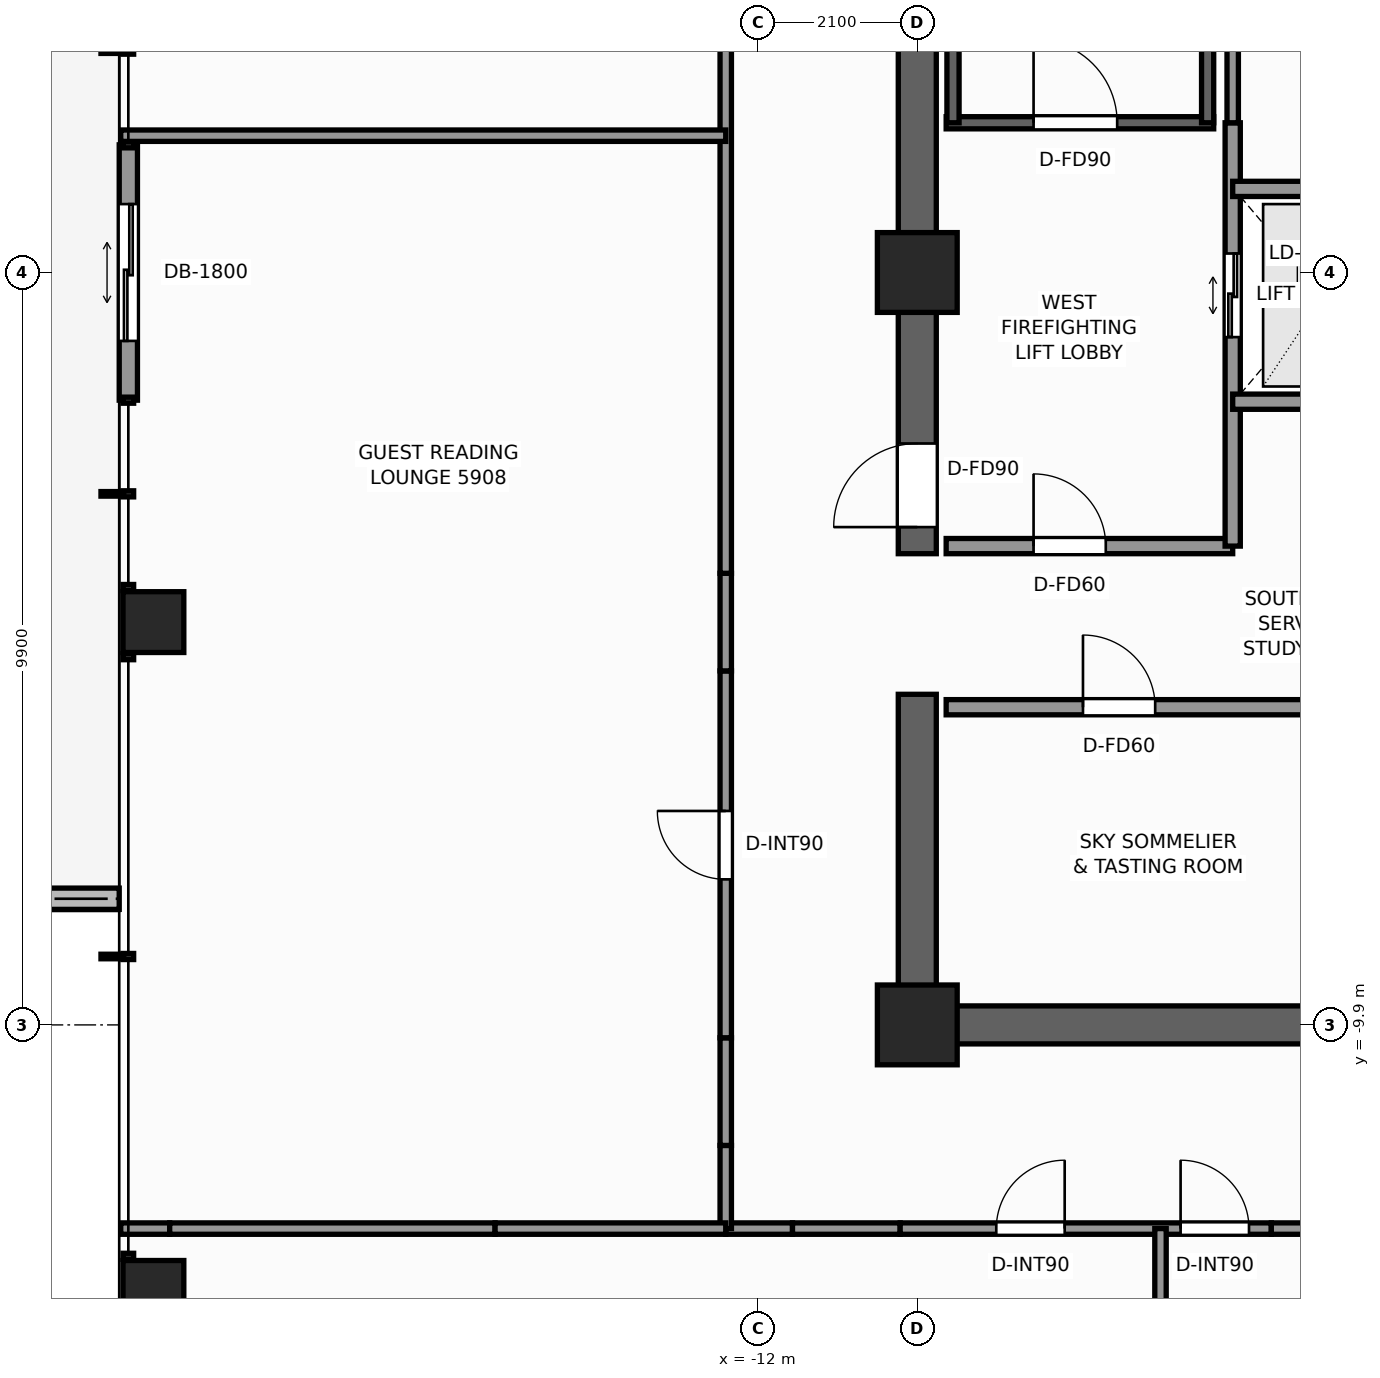
"""IFC4 building model, lengths in metres.
Left out: names, types, materials, properties, quantities, classifications, styles, units other than length and angle.
Written with IfcOpenShell. Run it as: python <this file> out.ifc"""

import sys

from ifc_helpers import new_model, si_unit, direction, frame, frame_2d, origin, origin_2d, place, context, subcontext, project, spatial, rectangle, extrude, element, fill, save


model = new_model("IFC4")
c1 = context("Model", 3, precision=1e-05, world=origin(), true_north=direction((0.0, 1.0)))
c2 = subcontext(c1, "Body", "Model", "MODEL_VIEW")
j1 = project(units=[si_unit("LENGTHUNIT", "METRE"), si_unit("PLANEANGLEUNIT", "RADIAN")], contexts=[c1])
p1 = place(None, origin())
s1 = spatial("IfcSite", under=j1, at=p1, CompositionType="ELEMENT")
p2 = place(p1, origin())
s2 = spatial("IfcBuilding", under=s1, at=p2, CompositionType="ELEMENT")
p3 = place(p2, frame((0.0, 0.0, 203.1)))
s3 = spatial("IfcBuildingStorey", under=s2, at=p3, CompositionType="ELEMENT", Elevation=203.1)
p4 = place(p3, frame((-3.54, -9.9, 0.0), z_axis=(0.0, 0.0, 1.0), x_axis=(-1.0, 0.0, 0.0)))
e1 = element("IfcWall", 1, at=p4, inside=s3, PredefinedType="SHEAR", context=c2, shape_type="SweptSolid", body=[
    extrude(rectangle(XDim=6.61, YDim=0.5, at=frame_2d((3.305, 0.0))), origin(), (0.0, 0.0, 1.0), 3.3),
])
p5 = place(p3, frame((-9.9, -9.65, 0.0), z_axis=(0.0, 0.0, 1.0), x_axis=(0.0, 1.0, 0.0)))
e2 = element("IfcWall", 2, at=p5, inside=s3, PredefinedType="SHEAR", context=c2, shape_type="SweptSolid", body=[
    extrude(rectangle(XDim=4.1, YDim=0.5, at=frame_2d((2.05, 0.0))), origin(), (0.0, 0.0, 1.0), 3.3),
])
p6 = place(p3, frame((-9.9, -3.7, 0.0), z_axis=(0.0, 0.0, 1.0), x_axis=(0.0, 1.0, 0.0)))
e3 = element("IfcWall", 3, at=p6, inside=s3, PredefinedType="SHEAR", context=c2, shape_type="SweptSolid", body=[
    extrude(rectangle(XDim=13.35, YDim=0.5, at=frame_2d((6.675, 0.0))), origin(), (0.0, 0.0, 1.0), 3.3),
])
p7 = place(p6, frame((0.35, 0.0, 0.0)))
e4 = element("IfcOpeningElement", 4, at=p7, cuts=e3, PredefinedType="OPENING", context=c2, shape_type="SweptSolid", body=[
    extrude(rectangle(XDim=1.1, YDim=2.2, at=frame_2d((0.55, 1.1))), frame((0.0, 0.26, 0.0), z_axis=(0.0, -1.0, 0.0), x_axis=(1.0, 0.0, 0.0)), (0.0, 0.0, 1.0), 0.52),
])
for number, where, z_axis, x_axis in (
    (5, (-9.9, -9.9, 0.0), (0.0, 0.0, 1.0), (1.0, 0.0, 0.0)),
    (6, (-9.9, 0.0, 0.0), (0.0, 0.0, 1.0), (1.0, 0.0, 0.0)),
):
    element("IfcColumn", number, at=place(p3, frame(where, z_axis=z_axis, x_axis=x_axis)), inside=s3, PredefinedType="COLUMN", context=c2, shape_type="SweptSolid", body=[
        extrude(rectangle(XDim=1.05, YDim=1.05, at=origin_2d()), origin(), (0.0, 0.0, 1.0), 3.3),
    ])
for number, where, z_axis, x_axis in (
    (7, (-19.95, -13.4, 0.0), (0.0, 0.0, 1.0), (1.0, 0.0, 0.0)),
    (8, (-19.95, -4.6, 0.0), (0.0, 0.0, 1.0), (1.0, 0.0, 0.0)),
):
    element("IfcColumn", number, at=place(p3, frame(where, z_axis=z_axis, x_axis=x_axis)), inside=s3, PredefinedType="COLUMN", context=c2, shape_type="SweptSolid", body=[
        extrude(rectangle(XDim=0.8, YDim=0.8, at=origin_2d()), origin(), (0.0, 0.0, 1.0), 3.3),
    ])
p8 = place(p3, frame((-22.406, -8.24, -0.04), z_axis=(0.0, 0.0, 1.0), x_axis=(1.0, 0.0, 0.0)))
e9 = element("IfcWall", 9, at=p8, inside=s3, PredefinedType="PARAPET", context=c2, shape_type="SweptSolid", body=[
    extrude(rectangle(XDim=2.006, YDim=0.28, at=frame_2d((1.003, 0.0))), origin(), (0.0, 0.0, 1.0), 0.42),
])
p9 = place(p3, frame((-20.28, -1.68, 0.0), z_axis=(0.0, 0.0, 1.0), x_axis=(0.0, 1.0, 0.0)))
e10 = element("IfcWall", 10, at=p9, inside=s3, PredefinedType="STANDARD", context=c2, shape_type="SweptSolid", body=[
    extrude(rectangle(XDim=3.36, YDim=0.24, at=frame_2d((1.68, 0.0))), origin(), (0.0, 0.0, 1.0), 3.08),
])
p10 = place(p9, frame((0.78, 0.0, 0.0)))
e11 = element("IfcOpeningElement", 11, at=p10, cuts=e10, PredefinedType="OPENING", context=c2, shape_type="SweptSolid", body=[
    extrude(rectangle(XDim=1.8, YDim=2.2, at=frame_2d((0.9, 1.1))), frame((0.0, 0.13, 0.0), z_axis=(0.0, -1.0, 0.0), x_axis=(1.0, 0.0, 0.0)), (0.0, 0.0, 1.0), 0.26),
])
p11 = place(p3, frame((-9.52, 1.97, 0.0), z_axis=(0.0, 0.0, 1.0), x_axis=(1.0, 0.0, 0.0)))
e12 = element("IfcWall", 12, at=p11, inside=s3, PredefinedType="SHEAR", context=c2, shape_type="SweptSolid", body=[
    extrude(rectangle(XDim=3.52, YDim=0.16, at=frame_2d((1.76, 0.0))), origin(), (0.0, 0.0, 1.0), 3.3),
])
p12 = place(p11, frame((1.15, 0.0, 0.0)))
e13 = element("IfcOpeningElement", 13, at=p12, cuts=e12, PredefinedType="OPENING", context=c2, shape_type="SweptSolid", body=[
    extrude(rectangle(XDim=1.1, YDim=2.2, at=frame_2d((0.55, 1.1))), frame((0.0, 0.09, 0.0), z_axis=(0.0, -1.0, 0.0), x_axis=(1.0, 0.0, 0.0)), (0.0, 0.0, 1.0), 0.18),
])
for number, where, z_axis, x_axis in (
    (14, (-9.43, 1.97, 0.0), (0.0, 0.0, 1.0), (0.0, 1.0, 0.0)),
    (15, (-6.08, 1.97, 0.0), (0.0, 0.0, 1.0), (0.0, 1.0, 0.0)),
):
    element("IfcWall", number, at=place(p3, frame(where, z_axis=z_axis, x_axis=x_axis)), inside=s3, PredefinedType="SHEAR", context=c2, shape_type="SweptSolid", body=[
        extrude(rectangle(XDim=7.56, YDim=0.16, at=frame_2d((3.78, 0.0))), origin(), (0.0, 0.0, 1.0), 3.3),
    ])
p13 = place(p3, frame((-9.52, -3.6, 0.0), z_axis=(0.0, 0.0, 1.0), x_axis=(1.0, 0.0, 0.0)))
e16 = element("IfcWall", 16, at=p13, inside=s3, PredefinedType="SOLIDWALL", context=c2, shape_type="SweptSolid", body=[
    extrude(rectangle(XDim=3.77, YDim=0.2, at=frame_2d((1.885, 0.0))), origin(), (0.0, 0.0, 1.0), 3.08),
])
p14 = place(p13, frame((1.15, 0.0, 0.0)))
e17 = element("IfcOpeningElement", 17, at=p14, cuts=e16, PredefinedType="OPENING", context=c2, shape_type="SweptSolid", body=[
    extrude(rectangle(XDim=0.95, YDim=2.06, at=frame_2d((0.475, 1.03))), frame((0.0, 0.11, 0.0), z_axis=(0.0, -1.0, 0.0), x_axis=(1.0, 0.0, 0.0)), (0.0, 0.0, 1.0), 0.22),
])
p15 = place(p3, frame((-5.75, -3.6, 0.0), z_axis=(0.0, 0.0, 1.0), x_axis=(0.0, 1.0, 0.0)))
e18 = element("IfcWall", 18, at=p15, inside=s3, PredefinedType="SOLIDWALL", context=c2, shape_type="SweptSolid", body=[
    extrude(rectangle(XDim=5.57, YDim=0.2, at=frame_2d((2.785, 0.0))), origin(), (0.0, 0.0, 1.0), 3.08),
])
p16 = place(p15, frame((2.75, 0.0, 0.0)))
e19 = element("IfcOpeningElement", 19, at=p16, cuts=e18, PredefinedType="OPENING", context=c2, shape_type="SweptSolid", body=[
    extrude(rectangle(XDim=1.1, YDim=2.2, at=frame_2d((0.55, 1.1))), frame((0.0, 0.11, 0.0), z_axis=(0.0, -1.0, 0.0), x_axis=(1.0, 0.0, 0.0)), (0.0, 0.0, 1.0), 0.22),
])
for number, where, z_axis, x_axis in (
    (20, (-5.75, -1.7, 0.0), (0.0, 0.0, 1.0), (1.0, 0.0, 0.0)),
    (21, (-5.75, 1.1, 0.0), (0.0, 0.0, 1.0), (1.0, 0.0, 0.0)),
):
    element("IfcWall", number, at=place(p3, frame(where, z_axis=z_axis, x_axis=x_axis)), inside=s3, PredefinedType="SOLIDWALL", context=c2, shape_type="SweptSolid", body=[
        extrude(rectangle(XDim=2.4, YDim=0.2, at=frame_2d((1.2, 0.0))), origin(), (0.0, 0.0, 1.0), 3.08),
    ])
p17 = place(p3, frame((-9.52, -5.72, 0.0), z_axis=(0.0, 0.0, 1.0), x_axis=(1.0, 0.0, 0.0)))
e22 = element("IfcWall", 22, at=p17, inside=s3, PredefinedType="SOLIDWALL", context=c2, shape_type="SweptSolid", body=[
    extrude(rectangle(XDim=5.66, YDim=0.2, at=frame_2d((2.83, 0.0))), origin(), (0.0, 0.0, 1.0), 3.08),
])
p18 = place(p17, frame((1.8, 0.0, 0.0)))
e23 = element("IfcOpeningElement", 23, at=p18, cuts=e22, PredefinedType="OPENING", context=c2, shape_type="SweptSolid", body=[
    extrude(rectangle(XDim=0.95, YDim=2.06, at=frame_2d((0.475, 1.03))), frame((0.0, 0.11, 0.0), z_axis=(0.0, -1.0, 0.0), x_axis=(1.0, 0.0, 0.0)), (0.0, 0.0, 1.0), 0.22),
])
p19 = place(p3, frame((-5.75, 1.97, 0.0), z_axis=(0.0, 0.0, 1.0), x_axis=(0.0, 1.0, 0.0)))
e24 = element("IfcWall", 24, at=p19, inside=s3, PredefinedType="PARTITIONING", context=c2, shape_type="SweptSolid", body=[
    extrude(rectangle(XDim=2.33, YDim=0.15, at=frame_2d((1.165, 0.0))), origin(), (0.0, 0.0, 1.0), 3.08),
])
p20 = place(p3, frame((-12.42, -12.58, 0.0), z_axis=(0.0, 0.0, 1.0), x_axis=(1.0, 0.0, 0.0)))
e25 = element("IfcWall", 25, at=p20, inside=s3, PredefinedType="PARTITIONING", context=c2, shape_type="SweptSolid", body=[
    extrude(rectangle(XDim=0.878, YDim=0.15, at=frame_2d((0.439, 0.0))), origin(), (0.0, 0.0, 1.0), 3.08),
])
p21 = place(p3, frame((-11.542, -12.58, 0.0), z_axis=(0.0, 0.0, 1.0), x_axis=(1.0, 0.0, 0.0)))
e26 = element("IfcWall", 26, at=p21, inside=s3, PredefinedType="PARTITIONING", context=c2, shape_type="SweptSolid", body=[
    extrude(rectangle(XDim=1.417, YDim=0.15, at=frame_2d((0.708, 0.0))), origin(), (0.0, 0.0, 1.0), 1.265),
])
p22 = place(p3, frame((-10.125, -12.58, 0.0), z_axis=(0.0, 0.0, 1.0), x_axis=(1.0, 0.0, 0.0)))
e27 = element("IfcWall", 27, at=p22, inside=s3, PredefinedType="PARTITIONING", context=c2, shape_type="SweptSolid", body=[
    extrude(rectangle(XDim=4.883, YDim=0.15, at=frame_2d((2.441, 0.0))), origin(), (0.0, 0.0, 1.0), 3.08),
])
p23 = place(p22, frame((1.264, 0.0, 0.0)))
e28 = element("IfcOpeningElement", 28, at=p23, cuts=e27, PredefinedType="OPENING", context=c2, shape_type="SweptSolid", body=[
    extrude(rectangle(XDim=0.9, YDim=2.06, at=frame_2d((0.45, 1.03))), frame((0.0, 0.085, 0.0), z_axis=(0.0, -1.0, 0.0), x_axis=(1.0, 0.0, 0.0)), (0.0, 0.0, 1.0), 0.17),
])
p24 = place(p22, frame((3.689, 0.0, 0.0)))
e29 = element("IfcOpeningElement", 29, at=p24, cuts=e27, PredefinedType="OPENING", context=c2, shape_type="SweptSolid", body=[
    extrude(rectangle(XDim=0.9, YDim=2.06, at=frame_2d((0.45, 1.03))), frame((0.0, 0.085, 0.0), z_axis=(0.0, -1.0, 0.0), x_axis=(1.0, 0.0, 0.0)), (0.0, 0.0, 1.0), 0.17),
])
p25 = place(p3, frame((-5.242, -12.58, 0.0), z_axis=(0.0, 0.0, 1.0), x_axis=(1.0, 0.0, 0.0)))
e30 = element("IfcWall", 30, at=p25, inside=s3, PredefinedType="PARTITIONING", context=c2, shape_type="SweptSolid", body=[
    extrude(rectangle(XDim=1.284, YDim=0.15, at=frame_2d((0.642, 0.0))), origin(), (0.0, 0.0, 1.0), 1.265),
])
p26 = place(p3, frame((-12.42, -12.58, 0.0), z_axis=(0.0, 0.0, 1.0), x_axis=(0.0, 1.0, 0.0)))
e31 = element("IfcWall", 31, at=p26, inside=s3, PredefinedType="PARTITIONING", context=c2, shape_type="SweptSolid", body=[
    extrude(rectangle(XDim=1.094, YDim=0.15, at=frame_2d((0.547, 0.0))), origin(), (0.0, 0.0, 1.0), 3.08),
])
p27 = place(p3, frame((-12.42, -11.486, 0.0), z_axis=(0.0, 0.0, 1.0), x_axis=(0.0, 1.0, 0.0)))
e32 = element("IfcWall", 32, at=p27, inside=s3, PredefinedType="PARTITIONING", context=c2, shape_type="SweptSolid", body=[
    extrude(rectangle(XDim=1.417, YDim=0.15, at=frame_2d((0.708, 0.0))), origin(), (0.0, 0.0, 1.0), 1.265),
])
p28 = place(p3, frame((-12.42, -10.069, 0.0), z_axis=(0.0, 0.0, 1.0), x_axis=(0.0, 1.0, 0.0)))
e33 = element("IfcWall", 33, at=p28, inside=s3, PredefinedType="PARTITIONING", context=c2, shape_type="SweptSolid", body=[
    extrude(rectangle(XDim=4.827, YDim=0.15, at=frame_2d((2.414, 0.0))), origin(), (0.0, 0.0, 1.0), 3.08),
])
p29 = place(p28, frame((2.084, 0.0, 0.0)))
e34 = element("IfcOpeningElement", 34, at=p29, cuts=e33, PredefinedType="OPENING", context=c2, shape_type="SweptSolid", body=[
    extrude(rectangle(XDim=0.9, YDim=2.06, at=frame_2d((0.45, 1.03))), frame((0.0, 0.085, 0.0), z_axis=(0.0, -1.0, 0.0), x_axis=(1.0, 0.0, 0.0)), (0.0, 0.0, 1.0), 0.17),
])
p30 = place(p3, frame((-12.42, -5.242, 0.0), z_axis=(0.0, 0.0, 1.0), x_axis=(0.0, 1.0, 0.0)))
e35 = element("IfcWall", 35, at=p30, inside=s3, PredefinedType="PARTITIONING", context=c2, shape_type="SweptSolid", body=[
    extrude(rectangle(XDim=1.284, YDim=0.15, at=frame_2d((0.642, 0.0))), origin(), (0.0, 0.0, 1.0), 1.265),
])
p31 = place(p3, frame((-12.42, -3.958, 0.0), z_axis=(0.0, 0.0, 1.0), x_axis=(0.0, 1.0, 0.0)))
e36 = element("IfcWall", 36, at=p31, inside=s3, PredefinedType="PARTITIONING", context=c2, shape_type="SweptSolid", body=[
    extrude(rectangle(XDim=7.916, YDim=0.15, at=frame_2d((3.958, 0.0))), origin(), (0.0, 0.0, 1.0), 2.605),
])
p32 = place(p3, frame((-20.38, -12.58, 0.0), z_axis=(0.0, 0.0, 1.0), x_axis=(1.0, 0.0, 0.0)))
e37 = element("IfcWall", 37, at=p32, inside=s3, PredefinedType="PARTITIONING", context=c2, shape_type="SweptSolid", body=[
    extrude(rectangle(XDim=0.644, YDim=0.15, at=frame_2d((0.322, 0.0))), origin(), (0.0, 0.0, 1.0), 2.453),
])
p33 = place(p3, frame((-19.736, -12.58, 0.0), z_axis=(0.0, 0.0, 1.0), x_axis=(1.0, 0.0, 0.0)))
e38 = element("IfcWall", 38, at=p33, inside=s3, PredefinedType="PARTITIONING", context=c2, shape_type="SweptSolid", body=[
    extrude(rectangle(XDim=4.281, YDim=0.15, at=frame_2d((2.141, 0.0))), origin(), (0.0, 0.0, 1.0), 1.265),
])
p34 = place(p3, frame((-15.455, -12.58, 0.0), z_axis=(0.0, 0.0, 1.0), x_axis=(1.0, 0.0, 0.0)))
e39 = element("IfcWall", 39, at=p34, inside=s3, PredefinedType="PARTITIONING", context=c2, shape_type="SweptSolid", body=[
    extrude(rectangle(XDim=3.035, YDim=0.15, at=frame_2d((1.517, 0.0))), origin(), (0.0, 0.0, 1.0), 3.08),
])
p35 = place(p3, frame((-6.7, -20.38, 0.0), z_axis=(0.0, 0.0, 1.0), x_axis=(0.0, 1.0, 0.0)))
e40 = element("IfcWall", 40, at=p35, inside=s3, PredefinedType="PARTITIONING", context=c2, shape_type="SweptSolid", body=[
    extrude(rectangle(XDim=7.8, YDim=0.15, at=frame_2d((3.9, 0.0))), origin(), (0.0, 0.0, 1.0), 2.453),
])
p36 = place(p3, frame((-20.38, 1.8, 0.0), z_axis=(0.0, 0.0, 1.0), x_axis=(1.0, 0.0, 0.0)))
e41 = element("IfcWall", 41, at=p36, inside=s3, PredefinedType="PARTITIONING", context=c2, shape_type="SweptSolid", body=[
    extrude(rectangle(XDim=7.96, YDim=0.15, at=frame_2d((3.98, 0.0))), origin(), (0.0, 0.0, 1.0), 2.453),
])
p37 = place(p10, origin())
e42 = element("IfcDoor", 42, at=p37, inside=s3, OperationType="DOUBLE_DOOR_SLIDING", PredefinedType="DOOR", context=c2, shape_type="SweptSolid", body=[
    extrude(rectangle(XDim=1.8, YDim=2.2, at=frame_2d((0.9, 1.1))), frame((0.0, 0.025, 0.0), z_axis=(0.0, -1.0, 0.0), x_axis=(1.0, 0.0, 0.0)), (0.0, 0.0, 1.0), 0.05),
])
fill(e11, e42)
p38 = place(p12, origin())
e43 = element("IfcDoor", 43, at=p38, inside=s3, OperationType="SINGLE_SWING_LEFT", PredefinedType="DOOR", context=c2, shape_type="SweptSolid", body=[
    extrude(rectangle(XDim=1.1, YDim=2.2, at=frame_2d((0.55, 1.1))), frame((0.0, 0.025, 0.0), z_axis=(0.0, -1.0, 0.0), x_axis=(1.0, 0.0, 0.0)), (0.0, 0.0, 1.0), 0.05),
])
fill(e13, e43)
p39 = place(p7, origin())
e44 = element("IfcDoor", 44, at=p39, inside=s3, OperationType="SINGLE_SWING_LEFT", PredefinedType="DOOR", context=c2, shape_type="SweptSolid", body=[
    extrude(rectangle(XDim=1.1, YDim=2.2, at=frame_2d((0.55, 1.1))), frame((0.0, 0.025, 0.0), z_axis=(0.0, -1.0, 0.0), x_axis=(1.0, 0.0, 0.0)), (0.0, 0.0, 1.0), 0.05),
])
fill(e4, e44)
p40 = place(p16, origin())
e45 = element("IfcDoor", 45, at=p40, inside=s3, OperationType="DOUBLE_DOOR_SLIDING", PredefinedType="DOOR", context=c2, shape_type="SweptSolid", body=[
    extrude(rectangle(XDim=1.1, YDim=2.2, at=frame_2d((0.55, 1.1))), frame((0.0, 0.025, 0.0), z_axis=(0.0, -1.0, 0.0), x_axis=(1.0, 0.0, 0.0)), (0.0, 0.0, 1.0), 0.05),
])
fill(e19, e45)
p41 = place(p18, origin())
e46 = element("IfcDoor", 46, at=p41, inside=s3, OperationType="SINGLE_SWING_LEFT", PredefinedType="DOOR", context=c2, shape_type="SweptSolid", body=[
    extrude(rectangle(XDim=0.95, YDim=2.06, at=frame_2d((0.475, 1.03))), frame((0.0, 0.025, 0.0), z_axis=(0.0, -1.0, 0.0), x_axis=(1.0, 0.0, 0.0)), (0.0, 0.0, 1.0), 0.05),
])
fill(e23, e46)
p42 = place(p14, origin())
e47 = element("IfcDoor", 47, at=p42, inside=s3, OperationType="SINGLE_SWING_LEFT", PredefinedType="DOOR", context=c2, shape_type="SweptSolid", body=[
    extrude(rectangle(XDim=0.95, YDim=2.06, at=frame_2d((0.475, 1.03))), frame((0.0, 0.025, 0.0), z_axis=(0.0, -1.0, 0.0), x_axis=(1.0, 0.0, 0.0)), (0.0, 0.0, 1.0), 0.05),
])
fill(e17, e47)
p43 = place(p23, origin())
e48 = element("IfcDoor", 48, at=p43, inside=s3, OperationType="SINGLE_SWING_RIGHT", PredefinedType="DOOR", context=c2, shape_type="SweptSolid", body=[
    extrude(rectangle(XDim=0.9, YDim=2.06, at=frame_2d((0.45, 1.03))), frame((0.0, 0.025, 0.0), z_axis=(0.0, -1.0, 0.0), x_axis=(1.0, 0.0, 0.0)), (0.0, 0.0, 1.0), 0.05),
])
fill(e28, e48)
p44 = place(p24, origin())
e49 = element("IfcDoor", 49, at=p44, inside=s3, OperationType="SINGLE_SWING_LEFT", PredefinedType="DOOR", context=c2, shape_type="SweptSolid", body=[
    extrude(rectangle(XDim=0.9, YDim=2.06, at=frame_2d((0.45, 1.03))), frame((0.0, 0.025, 0.0), z_axis=(0.0, -1.0, 0.0), x_axis=(1.0, 0.0, 0.0)), (0.0, 0.0, 1.0), 0.05),
])
fill(e29, e49)
p45 = place(p29, origin())
e50 = element("IfcDoor", 50, at=p45, inside=s3, OperationType="SINGLE_SWING_RIGHT", PredefinedType="DOOR", context=c2, shape_type="SweptSolid", body=[
    extrude(rectangle(XDim=0.9, YDim=2.06, at=frame_2d((0.45, 1.03))), frame((0.0, 0.025, 0.0), z_axis=(0.0, -1.0, 0.0), x_axis=(1.0, 0.0, 0.0)), (0.0, 0.0, 1.0), 0.05),
])
fill(e34, e50)
save(model, sys.argv[1])
